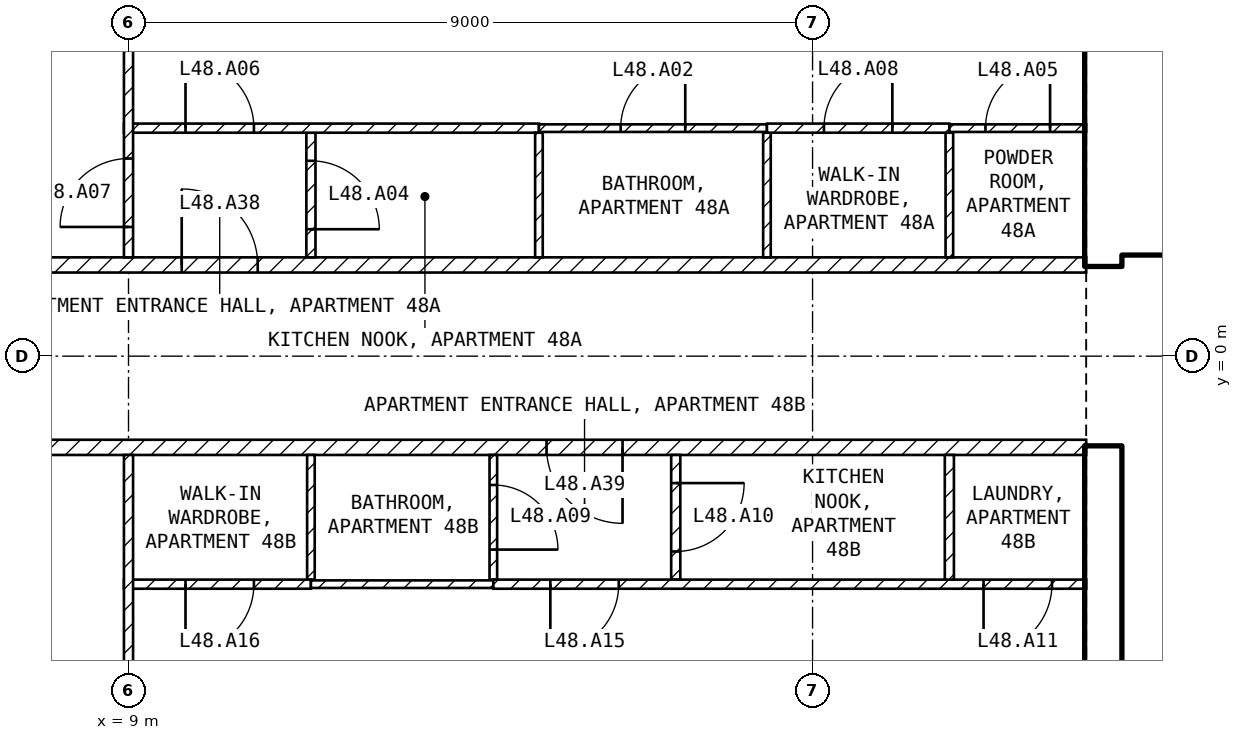
"""IFC4 building model, lengths in metres.
Left out: names, types, materials, properties, quantities, classifications, styles, units other than length and angle.
Written with IfcOpenShell. Run it as: python <this file> out.ifc"""

import sys

from ifc_helpers import new_model, si_unit, direction, frame, frame_2d, origin, place, context, subcontext, project, spatial, rectangle, extrude, element, fill, save


model = new_model("IFC4")
c1 = context("Model", 3, precision=1e-05, world=origin(), true_north=direction((0.0, 1.0)))
c2 = subcontext(c1, "Body", "Model", "MODEL_VIEW")
j1 = project(units=[si_unit("LENGTHUNIT", "METRE"), si_unit("PLANEANGLEUNIT", "RADIAN")], contexts=[c1])
p1 = place(None, origin())
s1 = spatial("IfcSite", under=j1, at=p1, CompositionType="ELEMENT")
p2 = place(p1, origin())
s2 = spatial("IfcBuilding", under=s1, at=p2, CompositionType="ELEMENT")
p3 = place(p2, frame((0.0, 0.0, 194.6)))
s3 = spatial("IfcBuildingStorey", under=s2, at=p3, CompositionType="ELEMENT", Elevation=194.6)
for number, where, z_axis, x_axis in (
    (1, (21.825, -8.1, 0.0), (0.0, 0.0, 1.0), (0.0, 1.0, 0.0)),
    (2, (21.825, 1.2, 0.0), (0.0, 0.0, 1.0), (0.0, 1.0, 0.0)),
):
    element("IfcWall", number, at=place(p3, frame(where, z_axis=z_axis, x_axis=x_axis)), inside=s3, PredefinedType="SHEAR", context=c2, shape_type="SweptSolid", body=[
        extrude(rectangle(XDim=6.9, YDim=0.45, at=frame_2d((3.45, 0.0))), origin(), (0.0, 0.0, 1.0), 3.25),
    ])
p4 = place(p3, frame((22.05, 1.45, 0.0), z_axis=(0.0, 0.0, 1.0), x_axis=(1.0, 0.0, 0.0)))
e3 = element("IfcWall", 3, at=p4, inside=s3, PredefinedType="SOLIDWALL", context=c2, shape_type="SweptSolid", body=[
    extrude(rectangle(XDim=11.15, YDim=0.2, at=frame_2d((5.575, 0.0))), origin(), (0.0, 0.0, 1.0), 3.25),
])
p5 = place(p4, frame((0.75, 0.0, 0.0)))
e4 = element("IfcOpeningElement", 4, at=p5, cuts=e3, PredefinedType="OPENING", context=c2, shape_type="SweptSolid", body=[
    extrude(rectangle(XDim=1.0, YDim=2.1, at=frame_2d((0.5, 1.05))), frame((0.0, 0.11, 0.0), z_axis=(0.0, -1.0, 0.0), x_axis=(1.0, 0.0, 0.0)), (0.0, 0.0, 1.0), 0.22),
])
p6 = place(p4, frame((3.25, 0.0, 0.0)))
e5 = element("IfcOpeningElement", 5, at=p6, cuts=e3, PredefinedType="OPENING", context=c2, shape_type="SweptSolid", body=[
    extrude(rectangle(XDim=1.0, YDim=2.1, at=frame_2d((0.5, 1.05))), frame((0.0, 0.11, 0.0), z_axis=(0.0, -1.0, 0.0), x_axis=(1.0, 0.0, 0.0)), (0.0, 0.0, 1.0), 0.22),
])
p7 = place(p4, frame((9.15, 0.0, 0.0)))
e6 = element("IfcOpeningElement", 6, at=p7, cuts=e3, PredefinedType="OPENING", context=c2, shape_type="SweptSolid", body=[
    extrude(rectangle(XDim=0.9, YDim=2.1, at=frame_2d((0.45, 1.05))), frame((0.0, 0.11, 0.0), z_axis=(0.0, -1.0, 0.0), x_axis=(1.0, 0.0, 0.0)), (0.0, 0.0, 1.0), 0.22),
])
p8 = place(p3, frame((4.4, 1.2, 0.0), z_axis=(0.0, 0.0, 1.0), x_axis=(1.0, 0.0, 0.0)))
e7 = element("IfcWall", 7, at=p8, inside=s3, PredefinedType="PARTITIONING", context=c2, shape_type="SweptSolid", body=[
    extrude(rectangle(XDim=17.2, YDim=0.2, at=frame_2d((8.6, 0.0))), origin(), (0.0, 0.0, 1.0), 3.25),
])
p9 = place(p8, frame((5.3, 0.0, 0.0)))
e8 = element("IfcOpeningElement", 8, at=p9, cuts=e7, PredefinedType="OPENING", context=c2, shape_type="SweptSolid", body=[
    extrude(rectangle(XDim=1.0, YDim=2.1, at=frame_2d((0.5, 1.05))), frame((0.0, 0.11, 0.0), z_axis=(0.0, -1.0, 0.0), x_axis=(1.0, 0.0, 0.0)), (0.0, 0.0, 1.0), 0.22),
])
p10 = place(p3, frame((21.6, -1.2, 0.0), z_axis=(0.0, 0.0, 1.0), x_axis=(-1.0, 0.0, 0.0)))
e9 = element("IfcWall", 9, at=p10, inside=s3, PredefinedType="PARTITIONING", context=c2, shape_type="SweptSolid", body=[
    extrude(rectangle(XDim=17.2, YDim=0.2, at=frame_2d((8.6, 0.0))), origin(), (0.0, 0.0, 1.0), 3.25),
])
p11 = place(p10, frame((6.1, 0.0, 0.0)))
e10 = element("IfcOpeningElement", 10, at=p11, cuts=e9, PredefinedType="OPENING", context=c2, shape_type="SweptSolid", body=[
    extrude(rectangle(XDim=1.0, YDim=2.1, at=frame_2d((0.5, 1.05))), frame((0.0, 0.11, 0.0), z_axis=(0.0, -1.0, 0.0), x_axis=(1.0, 0.0, 0.0)), (0.0, 0.0, 1.0), 0.22),
])
p12 = place(p3, frame((11.4, 2.94, 0.0), z_axis=(0.0, 0.0, 1.0), x_axis=(0.0, -1.0, 0.0)))
e11 = element("IfcWall", 11, at=p12, inside=s3, PredefinedType="PARTITIONING", context=c2, shape_type="SweptSolid", body=[
    extrude(rectangle(XDim=1.64, YDim=0.12, at=frame_2d((0.82, 0.0))), origin(), (0.0, 0.0, 1.0), 3.25),
])
p13 = place(p12, frame((0.37, 0.0, 0.0)))
e12 = element("IfcOpeningElement", 12, at=p13, cuts=e11, PredefinedType="OPENING", context=c2, shape_type="SweptSolid", body=[
    extrude(rectangle(XDim=0.9, YDim=2.1, at=frame_2d((0.45, 1.05))), frame((0.0, 0.07, 0.0), z_axis=(0.0, -1.0, 0.0), x_axis=(1.0, 0.0, 0.0)), (0.0, 0.0, 1.0), 0.14),
])
p14 = place(p3, frame((8.94, 3.0, 0.0), z_axis=(0.0, 0.0, 1.0), x_axis=(1.0, 0.0, 0.0)))
e13 = element("IfcWall", 13, at=p14, inside=s3, PredefinedType="PARTITIONING", context=c2, shape_type="SweptSolid", body=[
    extrude(rectangle(XDim=5.46, YDim=0.12, at=frame_2d((2.73, 0.0))), origin(), (0.0, 0.0, 1.0), 3.25),
])
p15 = place(p14, frame((0.81, 0.0, 0.0)))
e14 = element("IfcOpeningElement", 14, at=p15, cuts=e13, PredefinedType="OPENING", context=c2, shape_type="SweptSolid", body=[
    extrude(rectangle(XDim=0.9, YDim=2.1, at=frame_2d((0.45, 1.05))), frame((0.0, 0.07, 0.0), z_axis=(0.0, -1.0, 0.0), x_axis=(1.0, 0.0, 0.0)), (0.0, 0.0, 1.0), 0.14),
])
p16 = place(p3, frame((9.0, 1.3, 0.0), z_axis=(0.0, 0.0, 1.0), x_axis=(0.0, 1.0, 0.0)))
e15 = element("IfcWall", 15, at=p16, inside=s3, PredefinedType="PARTITIONING", context=c2, shape_type="SweptSolid", body=[
    extrude(rectangle(XDim=7.62, YDim=0.12, at=frame_2d((3.81, 0.0))), origin(), (0.0, 0.0, 1.0), 3.25),
])
p17 = place(p16, frame((0.4, 0.0, 0.0)))
e16 = element("IfcOpeningElement", 16, at=p17, cuts=e15, PredefinedType="OPENING", context=c2, shape_type="SweptSolid", body=[
    extrude(rectangle(XDim=0.9, YDim=2.1, at=frame_2d((0.45, 1.05))), frame((0.0, 0.07, 0.0), z_axis=(0.0, -1.0, 0.0), x_axis=(1.0, 0.0, 0.0)), (0.0, 0.0, 1.0), 0.14),
])
for number, where, z_axis, x_axis in (
    (17, (14.4, 2.94, 0.0), (0.0, 0.0, 1.0), (0.0, -1.0, 0.0)),
    (18, (17.4, 2.94, 0.0), (0.0, 0.0, 1.0), (0.0, -1.0, 0.0)),
):
    element("IfcWall", number, at=place(p3, frame(where, z_axis=z_axis, x_axis=x_axis)), inside=s3, PredefinedType="PARTITIONING", context=c2, shape_type="SweptSolid", body=[
        extrude(rectangle(XDim=1.64, YDim=0.1, at=frame_2d((0.82, 0.0))), origin(), (0.0, 0.0, 1.0), 3.25),
    ])
p18 = place(p3, frame((14.4, 3.0, 0.0), z_axis=(0.0, 0.0, 1.0), x_axis=(1.0, 0.0, 0.0)))
e19 = element("IfcWall", 19, at=p18, inside=s3, PredefinedType="PARTITIONING", context=c2, shape_type="SweptSolid", body=[
    extrude(rectangle(XDim=3.0, YDim=0.1, at=frame_2d((1.5, 0.0))), origin(), (0.0, 0.0, 1.0), 3.25),
])
p19 = place(p18, frame((1.075, 0.0, 0.0)))
e20 = element("IfcOpeningElement", 20, at=p19, cuts=e19, PredefinedType="OPENING", context=c2, shape_type="SweptSolid", body=[
    extrude(rectangle(XDim=0.85, YDim=2.1, at=frame_2d((0.425, 1.05))), frame((0.0, 0.06, 0.0), z_axis=(0.0, -1.0, 0.0), x_axis=(1.0, 0.0, 0.0)), (0.0, 0.0, 1.0), 0.12),
])
p20 = place(p3, frame((19.8, 2.94, 0.0), z_axis=(0.0, 0.0, 1.0), x_axis=(0.0, -1.0, 0.0)))
e21 = element("IfcWall", 21, at=p20, inside=s3, PredefinedType="PARTITIONING", context=c2, shape_type="SweptSolid", body=[
    extrude(rectangle(XDim=1.64, YDim=0.1, at=frame_2d((0.82, 0.0))), origin(), (0.0, 0.0, 1.0), 3.25),
])
p21 = place(p3, frame((17.4, 3.0, 0.0), z_axis=(0.0, 0.0, 1.0), x_axis=(1.0, 0.0, 0.0)))
e22 = element("IfcWall", 22, at=p21, inside=s3, PredefinedType="PARTITIONING", context=c2, shape_type="SweptSolid", body=[
    extrude(rectangle(XDim=2.4, YDim=0.12, at=frame_2d((1.2, 0.0))), origin(), (0.0, 0.0, 1.0), 3.25),
])
p22 = place(p21, frame((0.75, 0.0, 0.0)))
e23 = element("IfcOpeningElement", 23, at=p22, cuts=e22, PredefinedType="OPENING", context=c2, shape_type="SweptSolid", body=[
    extrude(rectangle(XDim=0.9, YDim=2.1, at=frame_2d((0.45, 1.05))), frame((0.0, 0.07, 0.0), z_axis=(0.0, -1.0, 0.0), x_axis=(1.0, 0.0, 0.0)), (0.0, 0.0, 1.0), 0.14),
])
p23 = place(p3, frame((19.8, 3.0, 0.0), z_axis=(0.0, 0.0, 1.0), x_axis=(1.0, 0.0, 0.0)))
e24 = element("IfcWall", 24, at=p23, inside=s3, PredefinedType="PARTITIONING", context=c2, shape_type="SweptSolid", body=[
    extrude(rectangle(XDim=1.8, YDim=0.1, at=frame_2d((0.9, 0.0))), origin(), (0.0, 0.0, 1.0), 3.25),
])
p24 = place(p23, frame((0.475, 0.0, 0.0)))
e25 = element("IfcOpeningElement", 25, at=p24, cuts=e24, PredefinedType="OPENING", context=c2, shape_type="SweptSolid", body=[
    extrude(rectangle(XDim=0.85, YDim=2.1, at=frame_2d((0.425, 1.05))), frame((0.0, 0.06, 0.0), z_axis=(0.0, -1.0, 0.0), x_axis=(1.0, 0.0, 0.0)), (0.0, 0.0, 1.0), 0.12),
])
p25 = place(p3, frame((11.4, -1.3, 0.0), z_axis=(0.0, 0.0, 1.0), x_axis=(0.0, -1.0, 0.0)))
e26 = element("IfcWall", 26, at=p25, inside=s3, PredefinedType="PARTITIONING", context=c2, shape_type="SweptSolid", body=[
    extrude(rectangle(XDim=1.64, YDim=0.1, at=frame_2d((0.82, 0.0))), origin(), (0.0, 0.0, 1.0), 3.25),
])
p26 = place(p3, frame((11.4, -3.0, 0.0), z_axis=(0.0, 0.0, 1.0), x_axis=(-1.0, 0.0, 0.0)))
e27 = element("IfcWall", 27, at=p26, inside=s3, PredefinedType="PARTITIONING", context=c2, shape_type="SweptSolid", body=[
    extrude(rectangle(XDim=2.46, YDim=0.12, at=frame_2d((1.23, 0.0))), origin(), (0.0, 0.0, 1.0), 3.25),
])
p27 = place(p26, frame((0.75, 0.0, 0.0)))
e28 = element("IfcOpeningElement", 28, at=p27, cuts=e27, PredefinedType="OPENING", context=c2, shape_type="SweptSolid", body=[
    extrude(rectangle(XDim=0.9, YDim=2.1, at=frame_2d((0.45, 1.05))), frame((0.0, 0.07, 0.0), z_axis=(0.0, -1.0, 0.0), x_axis=(1.0, 0.0, 0.0)), (0.0, 0.0, 1.0), 0.14),
])
p28 = place(p3, frame((9.0, -8.92, 0.0), z_axis=(0.0, 0.0, 1.0), x_axis=(0.0, 1.0, 0.0)))
e29 = element("IfcWall", 29, at=p28, inside=s3, PredefinedType="PARTITIONING", context=c2, shape_type="SweptSolid", body=[
    extrude(rectangle(XDim=7.62, YDim=0.12, at=frame_2d((3.81, 0.0))), origin(), (0.0, 0.0, 1.0), 3.25),
])
p29 = place(p28, frame((2.62, 0.0, 0.0)))
e30 = element("IfcOpeningElement", 30, at=p29, cuts=e29, PredefinedType="OPENING", context=c2, shape_type="SweptSolid", body=[
    extrude(rectangle(XDim=0.9, YDim=2.1, at=frame_2d((0.45, 1.05))), frame((0.0, 0.07, 0.0), z_axis=(0.0, -1.0, 0.0), x_axis=(1.0, 0.0, 0.0)), (0.0, 0.0, 1.0), 0.14),
])
p30 = place(p3, frame((13.8, -1.3, 0.0), z_axis=(0.0, 0.0, 1.0), x_axis=(0.0, -1.0, 0.0)))
e31 = element("IfcWall", 31, at=p30, inside=s3, PredefinedType="PARTITIONING", context=c2, shape_type="SweptSolid", body=[
    extrude(rectangle(XDim=1.64, YDim=0.1, at=frame_2d((0.82, 0.0))), origin(), (0.0, 0.0, 1.0), 3.25),
])
p31 = place(p30, frame((0.395, 0.0, 0.0)))
e32 = element("IfcOpeningElement", 32, at=p31, cuts=e31, PredefinedType="OPENING", context=c2, shape_type="SweptSolid", body=[
    extrude(rectangle(XDim=0.85, YDim=2.1, at=frame_2d((0.425, 1.05))), frame((0.0, 0.06, 0.0), z_axis=(0.0, -1.0, 0.0), x_axis=(1.0, 0.0, 0.0)), (0.0, 0.0, 1.0), 0.12),
])
p32 = place(p3, frame((13.8, -3.0, 0.0), z_axis=(0.0, 0.0, 1.0), x_axis=(-1.0, 0.0, 0.0)))
e33 = element("IfcWall", 33, at=p32, inside=s3, PredefinedType="PARTITIONING", context=c2, shape_type="SweptSolid", body=[
    extrude(rectangle(XDim=2.4, YDim=0.1, at=frame_2d((1.2, 0.0))), origin(), (0.0, 0.0, 1.0), 3.25),
])
p33 = place(p3, frame((16.2, -1.3, 0.0), z_axis=(0.0, 0.0, 1.0), x_axis=(0.0, -1.0, 0.0)))
e34 = element("IfcWall", 34, at=p33, inside=s3, PredefinedType="PARTITIONING", context=c2, shape_type="SweptSolid", body=[
    extrude(rectangle(XDim=1.64, YDim=0.12, at=frame_2d((0.82, 0.0))), origin(), (0.0, 0.0, 1.0), 3.25),
])
p34 = place(p33, frame((0.37, 0.0, 0.0)))
e35 = element("IfcOpeningElement", 35, at=p34, cuts=e34, PredefinedType="OPENING", context=c2, shape_type="SweptSolid", body=[
    extrude(rectangle(XDim=0.9, YDim=2.1, at=frame_2d((0.45, 1.05))), frame((0.0, 0.07, 0.0), z_axis=(0.0, -1.0, 0.0), x_axis=(1.0, 0.0, 0.0)), (0.0, 0.0, 1.0), 0.14),
])
p35 = place(p3, frame((21.6, -3.0, 0.0), z_axis=(0.0, 0.0, 1.0), x_axis=(-1.0, 0.0, 0.0)))
e36 = element("IfcWall", 36, at=p35, inside=s3, PredefinedType="PARTITIONING", context=c2, shape_type="SweptSolid", body=[
    extrude(rectangle(XDim=7.8, YDim=0.12, at=frame_2d((3.9, 0.0))), origin(), (0.0, 0.0, 1.0), 3.25),
])
p36 = place(p35, frame((0.45, 0.0, 0.0)))
e37 = element("IfcOpeningElement", 37, at=p36, cuts=e36, PredefinedType="OPENING", context=c2, shape_type="SweptSolid", body=[
    extrude(rectangle(XDim=0.9, YDim=2.1, at=frame_2d((0.45, 1.05))), frame((0.0, 0.07, 0.0), z_axis=(0.0, -1.0, 0.0), x_axis=(1.0, 0.0, 0.0)), (0.0, 0.0, 1.0), 0.14),
])
p37 = place(p35, frame((6.15, 0.0, 0.0)))
e38 = element("IfcOpeningElement", 38, at=p37, cuts=e36, PredefinedType="OPENING", context=c2, shape_type="SweptSolid", body=[
    extrude(rectangle(XDim=0.9, YDim=2.1, at=frame_2d((0.45, 1.05))), frame((0.0, 0.07, 0.0), z_axis=(0.0, -1.0, 0.0), x_axis=(1.0, 0.0, 0.0)), (0.0, 0.0, 1.0), 0.14),
])
p38 = place(p3, frame((19.8, -1.3, 0.0), z_axis=(0.0, 0.0, 1.0), x_axis=(0.0, -1.0, 0.0)))
e39 = element("IfcWall", 39, at=p38, inside=s3, PredefinedType="PARTITIONING", context=c2, shape_type="SweptSolid", body=[
    extrude(rectangle(XDim=1.64, YDim=0.12, at=frame_2d((0.82, 0.0))), origin(), (0.0, 0.0, 1.0), 3.25),
])
p39 = place(p19, origin())
e40 = element("IfcDoor", 40, at=p39, inside=s3, OperationType="SINGLE_SWING_RIGHT", PredefinedType="DOOR", context=c2, shape_type="SweptSolid", body=[
    extrude(rectangle(XDim=0.85, YDim=2.1, at=frame_2d((0.425, 1.05))), frame((0.0, 0.025, 0.0), z_axis=(0.0, -1.0, 0.0), x_axis=(1.0, 0.0, 0.0)), (0.0, 0.0, 1.0), 0.05),
])
fill(e20, e40)
p40 = place(p13, origin())
e41 = element("IfcDoor", 41, at=p40, inside=s3, OperationType="SINGLE_SWING_RIGHT", PredefinedType="DOOR", context=c2, shape_type="SweptSolid", body=[
    extrude(rectangle(XDim=0.9, YDim=2.1, at=frame_2d((0.45, 1.05))), frame((0.0, 0.025, 0.0), z_axis=(0.0, -1.0, 0.0), x_axis=(1.0, 0.0, 0.0)), (0.0, 0.0, 1.0), 0.05),
])
fill(e12, e41)
p41 = place(p24, origin())
e42 = element("IfcDoor", 42, at=p41, inside=s3, OperationType="SINGLE_SWING_RIGHT", PredefinedType="DOOR", context=c2, shape_type="SweptSolid", body=[
    extrude(rectangle(XDim=0.85, YDim=2.1, at=frame_2d((0.425, 1.05))), frame((0.0, 0.025, 0.0), z_axis=(0.0, -1.0, 0.0), x_axis=(1.0, 0.0, 0.0)), (0.0, 0.0, 1.0), 0.05),
])
fill(e25, e42)
p42 = place(p15, origin())
e43 = element("IfcDoor", 43, at=p42, inside=s3, OperationType="SINGLE_SWING_LEFT", PredefinedType="DOOR", context=c2, shape_type="SweptSolid", body=[
    extrude(rectangle(XDim=0.9, YDim=2.1, at=frame_2d((0.45, 1.05))), frame((0.0, 0.025, 0.0), z_axis=(0.0, -1.0, 0.0), x_axis=(1.0, 0.0, 0.0)), (0.0, 0.0, 1.0), 0.05),
])
fill(e14, e43)
p43 = place(p17, origin())
e44 = element("IfcDoor", 44, at=p43, inside=s3, OperationType="SINGLE_SWING_LEFT", PredefinedType="DOOR", context=c2, shape_type="SweptSolid", body=[
    extrude(rectangle(XDim=0.9, YDim=2.1, at=frame_2d((0.45, 1.05))), frame((0.0, 0.025, 0.0), z_axis=(0.0, -1.0, 0.0), x_axis=(1.0, 0.0, 0.0)), (0.0, 0.0, 1.0), 0.05),
])
fill(e16, e44)
p44 = place(p22, origin())
e45 = element("IfcDoor", 45, at=p44, inside=s3, OperationType="SINGLE_SWING_RIGHT", PredefinedType="DOOR", context=c2, shape_type="SweptSolid", body=[
    extrude(rectangle(XDim=0.9, YDim=2.1, at=frame_2d((0.45, 1.05))), frame((0.0, 0.025, 0.0), z_axis=(0.0, -1.0, 0.0), x_axis=(1.0, 0.0, 0.0)), (0.0, 0.0, 1.0), 0.05),
])
fill(e23, e45)
p45 = place(p31, origin())
e46 = element("IfcDoor", 46, at=p45, inside=s3, OperationType="SINGLE_SWING_RIGHT", PredefinedType="DOOR", context=c2, shape_type="SweptSolid", body=[
    extrude(rectangle(XDim=0.85, YDim=2.1, at=frame_2d((0.425, 1.05))), frame((0.0, 0.025, 0.0), z_axis=(0.0, -1.0, 0.0), x_axis=(1.0, 0.0, 0.0)), (0.0, 0.0, 1.0), 0.05),
])
fill(e32, e46)
p46 = place(p34, origin())
e47 = element("IfcDoor", 47, at=p46, inside=s3, OperationType="SINGLE_SWING_LEFT", PredefinedType="DOOR", context=c2, shape_type="SweptSolid", body=[
    extrude(rectangle(XDim=0.9, YDim=2.1, at=frame_2d((0.45, 1.05))), frame((0.0, 0.025, 0.0), z_axis=(0.0, -1.0, 0.0), x_axis=(1.0, 0.0, 0.0)), (0.0, 0.0, 1.0), 0.05),
])
fill(e35, e47)
p47 = place(p36, origin())
e48 = element("IfcDoor", 48, at=p47, inside=s3, OperationType="SINGLE_SWING_RIGHT", PredefinedType="DOOR", context=c2, shape_type="SweptSolid", body=[
    extrude(rectangle(XDim=0.9, YDim=2.1, at=frame_2d((0.45, 1.05))), frame((0.0, 0.025, 0.0), z_axis=(0.0, -1.0, 0.0), x_axis=(1.0, 0.0, 0.0)), (0.0, 0.0, 1.0), 0.05),
])
fill(e37, e48)
p48 = place(p37, origin())
e49 = element("IfcDoor", 49, at=p48, inside=s3, OperationType="SINGLE_SWING_RIGHT", PredefinedType="DOOR", context=c2, shape_type="SweptSolid", body=[
    extrude(rectangle(XDim=0.9, YDim=2.1, at=frame_2d((0.45, 1.05))), frame((0.0, 0.025, 0.0), z_axis=(0.0, -1.0, 0.0), x_axis=(1.0, 0.0, 0.0)), (0.0, 0.0, 1.0), 0.05),
])
fill(e38, e49)
p49 = place(p27, origin())
e50 = element("IfcDoor", 50, at=p49, inside=s3, OperationType="SINGLE_SWING_RIGHT", PredefinedType="DOOR", context=c2, shape_type="SweptSolid", body=[
    extrude(rectangle(XDim=0.9, YDim=2.1, at=frame_2d((0.45, 1.05))), frame((0.0, 0.025, 0.0), z_axis=(0.0, -1.0, 0.0), x_axis=(1.0, 0.0, 0.0)), (0.0, 0.0, 1.0), 0.05),
])
fill(e28, e50)
p50 = place(p9, origin())
e51 = element("IfcDoor", 51, at=p50, inside=s3, OperationType="SINGLE_SWING_LEFT", PredefinedType="DOOR", context=c2, shape_type="SweptSolid", body=[
    extrude(rectangle(XDim=1.0, YDim=2.1, at=frame_2d((0.5, 1.05))), frame((0.0, 0.025, 0.0), z_axis=(0.0, -1.0, 0.0), x_axis=(1.0, 0.0, 0.0)), (0.0, 0.0, 1.0), 0.05),
])
fill(e8, e51)
p51 = place(p11, origin())
e52 = element("IfcDoor", 52, at=p51, inside=s3, OperationType="SINGLE_SWING_LEFT", PredefinedType="DOOR", context=c2, shape_type="SweptSolid", body=[
    extrude(rectangle(XDim=1.0, YDim=2.1, at=frame_2d((0.5, 1.05))), frame((0.0, 0.025, 0.0), z_axis=(0.0, -1.0, 0.0), x_axis=(1.0, 0.0, 0.0)), (0.0, 0.0, 1.0), 0.05),
])
fill(e10, e52)
save(model, sys.argv[1])
